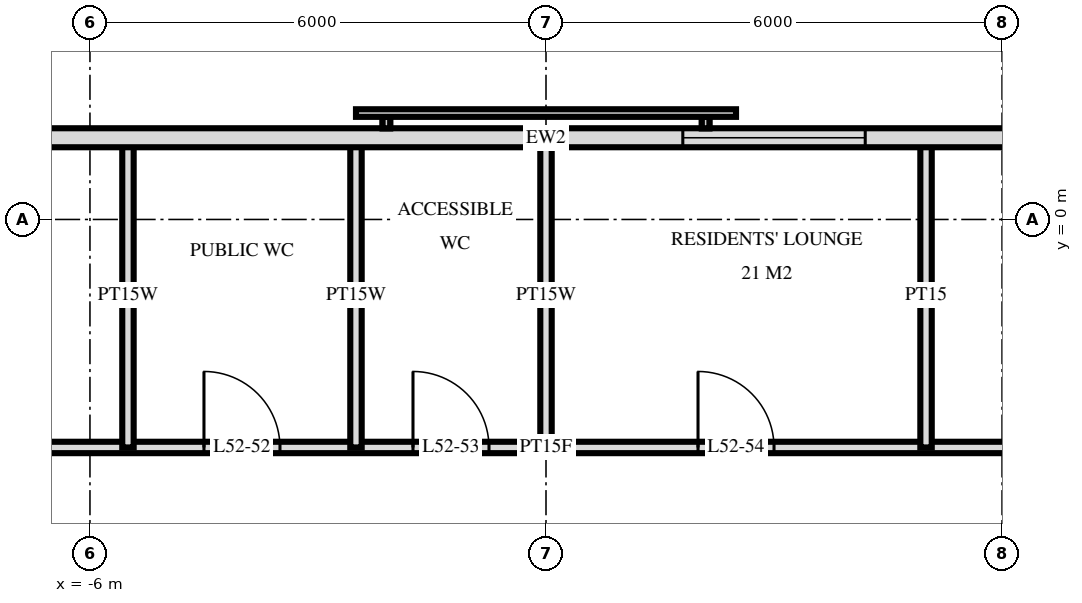
"""IFC4 building model, lengths in metres.
Left out: names, types, materials, properties, quantities, classifications, styles, units other than length and angle.
Written with IfcOpenShell. Run it as: python <this file> out.ifc"""

import sys

from ifc_helpers import new_model, si_unit, direction, frame, frame_2d, origin, place, context, subcontext, project, spatial, rectangle, extrude, element, fill, save


model = new_model("IFC4")
c1 = context("Model", 3, precision=1e-05, world=origin(), true_north=direction((0.0, 1.0)))
c2 = subcontext(c1, "Body", "Model", "MODEL_VIEW")
j1 = project(units=[si_unit("LENGTHUNIT", "METRE"), si_unit("PLANEANGLEUNIT", "RADIAN")], contexts=[c1])
p1 = place(None, origin())
s1 = spatial("IfcSite", under=j1, at=p1, CompositionType="ELEMENT")
p2 = place(p1, origin())
s2 = spatial("IfcBuilding", under=s1, at=p2, CompositionType="ELEMENT")
p3 = place(p2, frame((0.0, 0.0, 201.1)))
s3 = spatial("IfcBuildingStorey", under=s2, at=p3, CompositionType="ELEMENT", Elevation=201.1)
p4 = place(p3, frame((22.475, 1.075, 0.0), z_axis=(0.0, 0.0, 1.0), x_axis=(-1.0, 0.0, 0.0)))
e1 = element("IfcWall", 1, at=p4, inside=s3, PredefinedType="SOLIDWALL", context=c2, shape_type="SweptSolid", body=[
    extrude(rectangle(XDim=44.951, YDim=0.25, at=frame_2d((22.475, 0.0))), origin(), (0.0, 0.0, 1.0), 3.22),
])
p5 = place(p4, frame((13.775, 0.0, 0.9)))
e2 = element("IfcOpeningElement", 2, at=p5, cuts=e1, PredefinedType="OPENING", context=c2, shape_type="SweptSolid", body=[
    extrude(rectangle(XDim=2.4, YDim=1.5, at=frame_2d((1.2, 0.75))), frame((0.0, 0.135, 0.0), z_axis=(0.0, -1.0, 0.0), x_axis=(1.0, 0.0, 0.0)), (0.0, 0.0, 1.0), 0.27),
])
p6 = place(p4, frame((18.275, 0.0, 0.9)))
e3 = element("IfcOpeningElement", 3, at=p6, cuts=e1, PredefinedType="OPENING", context=c2, shape_type="SweptSolid", body=[
    extrude(rectangle(XDim=2.4, YDim=1.5, at=frame_2d((1.2, 0.75))), frame((0.0, 0.135, 0.0), z_axis=(0.0, -1.0, 0.0), x_axis=(1.0, 0.0, 0.0)), (0.0, 0.0, 1.0), 0.27),
])
p7 = place(p4, frame((29.025, 0.0, 0.9)))
e4 = element("IfcOpeningElement", 4, at=p7, cuts=e1, PredefinedType="OPENING", context=c2, shape_type="SweptSolid", body=[
    extrude(rectangle(XDim=2.4, YDim=1.5, at=frame_2d((1.2, 0.75))), frame((0.0, 0.135, 0.0), z_axis=(0.0, -1.0, 0.0), x_axis=(1.0, 0.0, 0.0)), (0.0, 0.0, 1.0), 0.27),
])
p8 = place(p3, frame((5.0, -3.0, 0.0), z_axis=(0.0, 0.0, 1.0), x_axis=(0.0, 1.0, 0.0)))
e5 = element("IfcWall", 5, at=p8, inside=s3, PredefinedType="PARTITIONING", context=c2, shape_type="SweptSolid", body=[
    extrude(rectangle(XDim=4.02, YDim=0.15, at=frame_2d((2.01, 0.0))), origin(), (0.0, 0.0, 1.0), 3.22),
])
for number, where, z_axis, x_axis in (
    (6, (0.0, -3.0, 0.0), (0.0, 0.0, 1.0), (0.0, 1.0, 0.0)),
    (7, (-2.5, -3.0, 0.0), (0.0, 0.0, 1.0), (0.0, 1.0, 0.0)),
    (8, (-5.5, -3.0, 0.0), (0.0, 0.0, 1.0), (0.0, 1.0, 0.0)),
):
    element("IfcWall", number, at=place(p3, frame(where, z_axis=z_axis, x_axis=x_axis)), inside=s3, PredefinedType="PLUMBINGWALL", context=c2, shape_type="SweptSolid", body=[
        extrude(rectangle(XDim=4.02, YDim=0.15, at=frame_2d((2.01, 0.0))), origin(), (0.0, 0.0, 1.0), 3.22),
    ])
p9 = place(p3, frame((-9.95, -3.0, 0.0), z_axis=(0.0, 0.0, 1.0), x_axis=(1.0, 0.0, 0.0)))
e9 = element("IfcWall", 9, at=p9, inside=s3, PredefinedType="PARTITIONING", context=c2, shape_type="SweptSolid", body=[
    extrude(rectangle(XDim=19.9, YDim=0.15, at=frame_2d((9.95, 0.0))), origin(), (0.0, 0.0, 1.0), 3.22),
])
p10 = place(p9, frame((1.7, 0.0, 0.0)))
e10 = element("IfcOpeningElement", 10, at=p10, cuts=e9, PredefinedType="OPENING", context=c2, shape_type="SweptSolid", body=[
    extrude(rectangle(XDim=1.0, YDim=2.1, at=frame_2d((0.5, 1.05))), frame((0.0, 0.085, 0.0), z_axis=(0.0, -1.0, 0.0), x_axis=(1.0, 0.0, 0.0)), (0.0, 0.0, 1.0), 0.17),
])
p11 = place(p9, frame((5.45, 0.0, 0.0)))
e11 = element("IfcOpeningElement", 11, at=p11, cuts=e9, PredefinedType="OPENING", context=c2, shape_type="SweptSolid", body=[
    extrude(rectangle(XDim=1.0, YDim=2.1, at=frame_2d((0.5, 1.05))), frame((0.0, 0.085, 0.0), z_axis=(0.0, -1.0, 0.0), x_axis=(1.0, 0.0, 0.0)), (0.0, 0.0, 1.0), 0.17),
])
p12 = place(p9, frame((8.2, 0.0, 0.0)))
e12 = element("IfcOpeningElement", 12, at=p12, cuts=e9, PredefinedType="OPENING", context=c2, shape_type="SweptSolid", body=[
    extrude(rectangle(XDim=1.0, YDim=2.1, at=frame_2d((0.5, 1.05))), frame((0.0, 0.085, 0.0), z_axis=(0.0, -1.0, 0.0), x_axis=(1.0, 0.0, 0.0)), (0.0, 0.0, 1.0), 0.17),
])
p13 = place(p9, frame((11.95, 0.0, 0.0)))
e13 = element("IfcOpeningElement", 13, at=p13, cuts=e9, PredefinedType="OPENING", context=c2, shape_type="SweptSolid", body=[
    extrude(rectangle(XDim=1.0, YDim=2.1, at=frame_2d((0.5, 1.05))), frame((0.0, 0.085, 0.0), z_axis=(0.0, -1.0, 0.0), x_axis=(1.0, 0.0, 0.0)), (0.0, 0.0, 1.0), 0.17),
])
p14 = place(p9, frame((16.95, 0.0, 0.0)))
e14 = element("IfcOpeningElement", 14, at=p14, cuts=e9, PredefinedType="OPENING", context=c2, shape_type="SweptSolid", body=[
    extrude(rectangle(XDim=1.0, YDim=2.1, at=frame_2d((0.5, 1.05))), frame((0.0, 0.085, 0.0), z_axis=(0.0, -1.0, 0.0), x_axis=(1.0, 0.0, 0.0)), (0.0, 0.0, 1.0), 0.17),
])
p15 = place(p6, origin())
e15 = element("IfcWindow", 15, at=p15, inside=s3, PartitioningType="SINGLE_PANEL", PredefinedType="WINDOW", context=c2, shape_type="SweptSolid", body=[
    extrude(rectangle(XDim=2.4, YDim=1.5, at=frame_2d((1.2, 0.75))), frame((0.0, 0.03, 0.0), z_axis=(0.0, -1.0, 0.0), x_axis=(1.0, 0.0, 0.0)), (0.0, 0.0, 1.0), 0.06),
])
fill(e3, e15)
p16 = place(p11, origin())
e16 = element("IfcDoor", 16, at=p16, inside=s3, OperationType="SINGLE_SWING_RIGHT", PredefinedType="DOOR", context=c2, shape_type="SweptSolid", body=[
    extrude(rectangle(XDim=1.0, YDim=2.1, at=frame_2d((0.5, 1.05))), frame((0.0, 0.025, 0.0), z_axis=(0.0, -1.0, 0.0), x_axis=(1.0, 0.0, 0.0)), (0.0, 0.0, 1.0), 0.05),
])
fill(e11, e16)
p17 = place(p12, origin())
e17 = element("IfcDoor", 17, at=p17, inside=s3, OperationType="SINGLE_SWING_RIGHT", PredefinedType="DOOR", context=c2, shape_type="SweptSolid", body=[
    extrude(rectangle(XDim=1.0, YDim=2.1, at=frame_2d((0.5, 1.05))), frame((0.0, 0.025, 0.0), z_axis=(0.0, -1.0, 0.0), x_axis=(1.0, 0.0, 0.0)), (0.0, 0.0, 1.0), 0.05),
])
fill(e12, e17)
p18 = place(p13, origin())
e18 = element("IfcDoor", 18, at=p18, inside=s3, OperationType="SINGLE_SWING_RIGHT", PredefinedType="DOOR", context=c2, shape_type="SweptSolid", body=[
    extrude(rectangle(XDim=1.0, YDim=2.1, at=frame_2d((0.5, 1.05))), frame((0.0, 0.025, 0.0), z_axis=(0.0, -1.0, 0.0), x_axis=(1.0, 0.0, 0.0)), (0.0, 0.0, 1.0), 0.05),
])
fill(e13, e18)
save(model, sys.argv[1])
